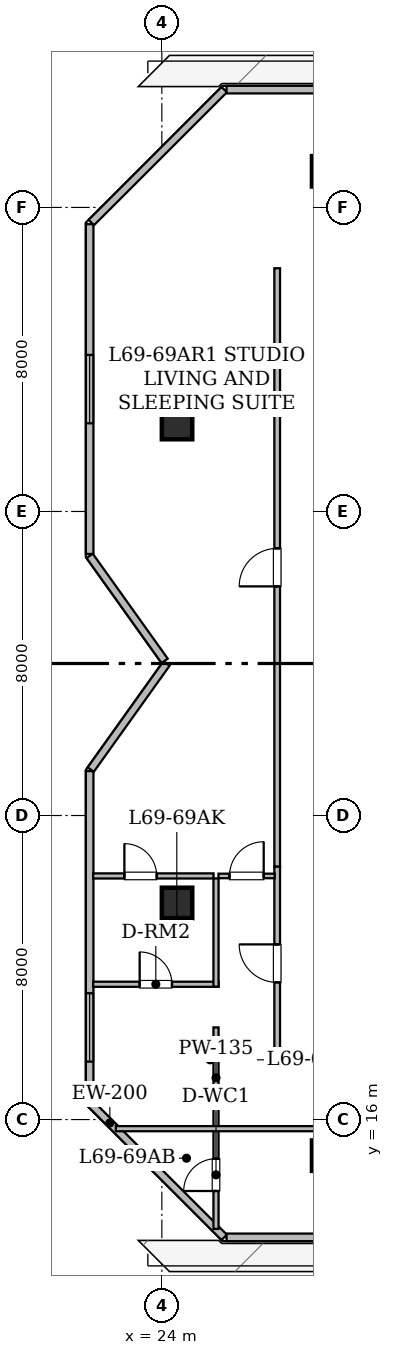
"""IFC4 building model, lengths in metres.
Left out: names, types, materials, properties, quantities, classifications, styles, units other than length and angle.
Written with IfcOpenShell. Run it as: python <this file> out.ifc"""

import sys

from ifc_helpers import new_model, si_unit, direction, frame, frame_2d, origin, origin_2d, place, context, subcontext, project, spatial, rectangle, hollow_rectangle, extrude, element, fill, save


model = new_model("IFC4")
c1 = context("Model", 3, precision=1e-05, world=origin(), true_north=direction((0.0, 1.0)))
c2 = subcontext(c1, "Body", "Model", "MODEL_VIEW")
j1 = project(units=[si_unit("LENGTHUNIT", "METRE"), si_unit("PLANEANGLEUNIT", "RADIAN")], contexts=[c1])
p1 = place(None, origin())
s1 = spatial("IfcSite", under=j1, at=p1, CompositionType="ELEMENT")
p2 = place(p1, origin())
s2 = spatial("IfcBuilding", under=s1, at=p2, CompositionType="ELEMENT")
p3 = place(p2, frame((0.0, 0.0, 269.45)))
s3 = spatial("IfcBuildingStorey", under=s2, at=p3, CompositionType="ELEMENT", Elevation=269.45)
for number, where, z_axis, x_axis in (
    (1, (28.35, 15.05, 0.025), (0.0, 0.0, 1.0), (1.0, 0.0, 0.0)),
    (2, (28.35, 40.95, 0.025), (0.0, 0.0, 1.0), (1.0, 0.0, 0.0)),
    (3, (24.4, 21.7, 0.025), (0.0, 0.0, 1.0), (1.0, 0.0, 0.0)),
    (4, (24.4, 34.3, 0.025), (0.0, 0.0, 1.0), (1.0, 0.0, 0.0)),
):
    element("IfcColumn", number, at=place(p3, frame(where, z_axis=z_axis, x_axis=x_axis)), inside=s3, PredefinedType="COLUMN", context=c2, shape_type="SweptSolid", body=[
        extrude(hollow_rectangle(XDim=0.8, YDim=0.8, WallThickness=0.04, at=origin_2d()), origin(), (0.0, 0.0, 1.0), 4.175),
    ])
p4 = place(p3, frame((25.641, 12.9, 0.0), z_axis=(0.0, 0.0, 1.0), x_axis=(-0.707106781187, 0.707106781187, 0.0)))
e5 = element("IfcWall", 5, at=p4, inside=s3, PredefinedType="STANDARD", context=c2, shape_type="SweptSolid", body=[
    extrude(rectangle(XDim=5.008, YDim=0.2, at=frame_2d((2.504, 0.0))), origin(), (0.0, 0.0, 1.0), 3.95),
])
p5 = place(p3, frame((22.1, 16.504, 0.0), z_axis=(0.0, 0.0, 1.0), x_axis=(0.0, 1.0, 0.0)))
e6 = element("IfcWall", 6, at=p5, inside=s3, PredefinedType="STANDARD", context=c2, shape_type="SweptSolid", body=[
    extrude(rectangle(XDim=8.664, YDim=0.2, at=frame_2d((4.332, 0.0))), origin(), (0.0, 0.0, 1.0), 3.95),
])
p6 = place(p5, frame((1.02, 0.0, 0.85)))
e7 = element("IfcOpeningElement", 7, at=p6, cuts=e6, PredefinedType="OPENING", context=c2, shape_type="SweptSolid", body=[
    extrude(rectangle(XDim=1.8, YDim=0.92, at=frame_2d((0.9, 0.46))), frame((0.0, 0.11, 0.0), z_axis=(0.0, -1.0, 0.0), x_axis=(1.0, 0.0, 0.0)), (0.0, 0.0, 1.0), 0.22),
])
p7 = place(p3, frame((22.128, 25.208, 0.0), z_axis=(0.0, 0.0, 1.0), x_axis=(0.581399701415, 0.813618084358, 0.0)))
e8 = element("IfcWall", 8, at=p7, inside=s3, PredefinedType="STANDARD", context=c2, shape_type="SweptSolid", body=[
    extrude(rectangle(XDim=3.432, YDim=0.2, at=frame_2d((1.716, 0.0))), origin(), (0.0, 0.0, 1.0), 3.95),
])
p8 = place(p3, frame((24.074, 28.069, 0.0), z_axis=(0.0, 0.0, 1.0), x_axis=(-0.581306204583, 0.813684887726, 0.0)))
e9 = element("IfcWall", 9, at=p8, inside=s3, PredefinedType="STANDARD", context=c2, shape_type="SweptSolid", body=[
    extrude(rectangle(XDim=3.396, YDim=0.2, at=frame_2d((1.698, 0.0))), origin(), (0.0, 0.0, 1.0), 3.95),
])
p9 = place(p3, frame((22.1, 30.882, 0.0), z_axis=(0.0, 0.0, 1.0), x_axis=(0.0, 1.0, 0.0)))
e10 = element("IfcWall", 10, at=p9, inside=s3, PredefinedType="STANDARD", context=c2, shape_type="SweptSolid", body=[
    extrude(rectangle(XDim=8.677, YDim=0.2, at=frame_2d((4.338, 0.0))), origin(), (0.0, 0.0, 1.0), 3.95),
])
p10 = place(p9, frame((3.438, 0.0, 0.85)))
e11 = element("IfcOpeningElement", 11, at=p10, cuts=e10, PredefinedType="OPENING", context=c2, shape_type="SweptSolid", body=[
    extrude(rectangle(XDim=1.8, YDim=0.92, at=frame_2d((0.9, 0.46))), frame((0.0, 0.11, 0.0), z_axis=(0.0, -1.0, 0.0), x_axis=(1.0, 0.0, 0.0)), (0.0, 0.0, 1.0), 0.22),
])
p11 = place(p3, frame((22.144, 39.603, 0.0), z_axis=(0.0, 0.0, 1.0), x_axis=(0.707106781187, 0.707106781187, 0.0)))
e12 = element("IfcWall", 12, at=p11, inside=s3, PredefinedType="STANDARD", context=c2, shape_type="SweptSolid", body=[
    extrude(rectangle(XDim=4.946, YDim=0.2, at=frame_2d((2.473, 0.0))), origin(), (0.0, 0.0, 1.0), 3.95),
])
p12 = place(p3, frame((25.702, 43.1, 0.0), z_axis=(0.0, 0.0, 1.0), x_axis=(1.0, 0.0, 0.0)))
e13 = element("IfcWall", 13, at=p12, inside=s3, PredefinedType="STANDARD", context=c2, shape_type="SweptSolid", body=[
    extrude(rectangle(XDim=38.657, YDim=0.2, at=frame_2d((19.329, 0.0))), origin(), (0.0, 0.0, 1.0), 3.95),
])
p13 = place(p12, frame((22.05, 0.0, 0.0)))
e14 = element("IfcOpeningElement", 14, at=p13, cuts=e13, PredefinedType="OPENING", context=c2, shape_type="SweptSolid", body=[
    extrude(rectangle(XDim=1.0, YDim=2.15, at=frame_2d((0.5, 1.075))), frame((0.0, 0.11, 0.0), z_axis=(0.0, -1.0, 0.0), x_axis=(1.0, 0.0, 0.0)), (0.0, 0.0, 1.0), 0.22),
])
p14 = place(p12, frame((18.633, 0.0, 0.78)))
e15 = element("IfcOpeningElement", 15, at=p14, cuts=e13, PredefinedType="OPENING", context=c2, shape_type="SweptSolid", body=[
    extrude(rectangle(XDim=1.2, YDim=1.5, at=frame_2d((0.6, 0.75))), frame((0.0, 0.11, 0.0), z_axis=(0.0, -1.0, 0.0), x_axis=(1.0, 0.0, 0.0)), (0.0, 0.0, 1.0), 0.22),
])
p15 = place(p12, frame((27.873, 0.0, 0.85)))
e16 = element("IfcOpeningElement", 16, at=p15, cuts=e13, PredefinedType="OPENING", context=c2, shape_type="SweptSolid", body=[
    extrude(rectangle(XDim=1.8, YDim=0.92, at=frame_2d((0.9, 0.46))), frame((0.0, 0.11, 0.0), z_axis=(0.0, -1.0, 0.0), x_axis=(1.0, 0.0, 0.0)), (0.0, 0.0, 1.0), 0.22),
])
p16 = place(p12, frame((35.193, 0.0, 0.85)))
e17 = element("IfcOpeningElement", 17, at=p16, cuts=e13, PredefinedType="OPENING", context=c2, shape_type="SweptSolid", body=[
    extrude(rectangle(XDim=1.8, YDim=0.92, at=frame_2d((0.9, 0.46))), frame((0.0, 0.11, 0.0), z_axis=(0.0, -1.0, 0.0), x_axis=(1.0, 0.0, 0.0)), (0.0, 0.0, 1.0), 0.22),
])
p17 = place(p3, frame((64.296, 12.9, 0.0), z_axis=(0.0, 0.0, 1.0), x_axis=(-1.0, 0.0, 0.0)))
e18 = element("IfcWall", 18, at=p17, inside=s3, PredefinedType="STANDARD", context=c2, shape_type="SweptSolid", body=[
    extrude(rectangle(XDim=38.593, YDim=0.2, at=frame_2d((19.296, 0.0))), origin(), (0.0, 0.0, 1.0), 3.95),
])
p18 = place(p17, frame((7.54, 0.0, 0.0)))
e19 = element("IfcOpeningElement", 19, at=p18, cuts=e18, PredefinedType="OPENING", context=c2, shape_type="SweptSolid", body=[
    extrude(rectangle(XDim=1.0, YDim=2.15, at=frame_2d((0.5, 1.075))), frame((0.0, 0.11, 0.0), z_axis=(0.0, -1.0, 0.0), x_axis=(1.0, 0.0, 0.0)), (0.0, 0.0, 1.0), 0.22),
])
p19 = place(p17, frame((18.396, 0.0, 0.78)))
e20 = element("IfcOpeningElement", 20, at=p19, cuts=e18, PredefinedType="OPENING", context=c2, shape_type="SweptSolid", body=[
    extrude(rectangle(XDim=1.2, YDim=1.5, at=frame_2d((0.6, 0.75))), frame((0.0, 0.11, 0.0), z_axis=(0.0, -1.0, 0.0), x_axis=(1.0, 0.0, 0.0)), (0.0, 0.0, 1.0), 0.22),
])
p20 = place(p17, frame((15.104, 0.0, 0.85)))
e21 = element("IfcOpeningElement", 21, at=p20, cuts=e18, PredefinedType="OPENING", context=c2, shape_type="SweptSolid", body=[
    extrude(rectangle(XDim=1.8, YDim=0.92, at=frame_2d((0.9, 0.46))), frame((0.0, 0.11, 0.0), z_axis=(0.0, -1.0, 0.0), x_axis=(1.0, 0.0, 0.0)), (0.0, 0.0, 1.0), 0.22),
])
p21 = place(p3, frame((27.035, 17.6, 0.0), z_axis=(0.0, 0.0, 1.0), x_axis=(0.0, 1.0, 0.0)))
e22 = element("IfcWall", 22, at=p21, inside=s3, PredefinedType="STANDARD", context=c2, shape_type="SweptSolid", body=[
    extrude(rectangle(XDim=5.059, YDim=0.15, at=frame_2d((2.529, 0.0))), origin(), (0.0, 0.0, 1.0), 3.237),
])
p22 = place(p21, frame((2.009, 0.0, 0.0)))
e23 = element("IfcOpeningElement", 23, at=p22, cuts=e22, PredefinedType="OPENING", context=c2, shape_type="SweptSolid", body=[
    extrude(rectangle(XDim=1.0, YDim=2.15, at=frame_2d((0.5, 1.075))), frame((0.0, 0.085, 0.0), z_axis=(0.0, -1.0, 0.0), x_axis=(1.0, 0.0, 0.0)), (0.0, 0.0, 1.0), 0.17),
])
p23 = place(p3, frame((27.035, 22.659, 0.0), z_axis=(0.0, 0.0, 1.0), x_axis=(0.0, 1.0, 0.0)))
e24 = element("IfcWall", 24, at=p23, inside=s3, PredefinedType="STANDARD", context=c2, shape_type="SweptSolid", body=[
    extrude(rectangle(XDim=15.741, YDim=0.15, at=frame_2d((7.871, 0.0))), origin(), (0.0, 0.0, 1.0), 3.237),
])
p24 = place(p23, frame((7.37, 0.0, 0.0)))
e25 = element("IfcOpeningElement", 25, at=p24, cuts=e24, PredefinedType="OPENING", context=c2, shape_type="SweptSolid", body=[
    extrude(rectangle(XDim=1.0, YDim=2.15, at=frame_2d((0.5, 1.075))), frame((0.0, 0.085, 0.0), z_axis=(0.0, -1.0, 0.0), x_axis=(1.0, 0.0, 0.0)), (0.0, 0.0, 1.0), 0.17),
])
p25 = place(p3, frame((25.425, 13.123, 0.0), z_axis=(0.0, 0.0, 1.0), x_axis=(0.0, 1.0, 0.0)))
e26 = element("IfcWall", 26, at=p25, inside=s3, PredefinedType="PARTITIONING", context=c2, shape_type="SweptSolid", body=[
    extrude(rectangle(XDim=5.302, YDim=0.135, at=frame_2d((2.651, 0.0))), origin(), (0.0, 0.0, 1.0), 3.95),
])
p26 = place(p25, frame((0.997, 0.0, 0.0)))
e27 = element("IfcOpeningElement", 27, at=p26, cuts=e26, PredefinedType="OPENING", context=c2, shape_type="SweptSolid", body=[
    extrude(rectangle(XDim=0.85, YDim=2.1, at=frame_2d((0.425, 1.05))), frame((0.0, 0.077, 0.0), z_axis=(0.0, -1.0, 0.0), x_axis=(1.0, 0.0, 0.0)), (0.0, 0.0, 1.0), 0.155),
])
p27 = place(p3, frame((28.09, 15.76, 0.0), z_axis=(0.0, 0.0, 1.0), x_axis=(-1.0, 0.0, 0.0)))
e28 = element("IfcWall", 28, at=p27, inside=s3, PredefinedType="PARTITIONING", context=c2, shape_type="SweptSolid", body=[
    extrude(rectangle(XDim=5.302, YDim=0.135, at=frame_2d((2.651, 0.0))), origin(), (0.0, 0.0, 1.0), 3.407),
])
p28 = place(p3, frame((22.192, 19.56, 0.0), z_axis=(0.0, 0.0, 1.0), x_axis=(1.0, 0.0, 0.0)))
e29 = element("IfcWall", 29, at=p28, inside=s3, PredefinedType="PARTITIONING", context=c2, shape_type="SweptSolid", body=[
    extrude(rectangle(XDim=3.298, YDim=0.135, at=frame_2d((1.649, 0.0))), origin(), (0.0, 0.0, 1.0), 3.95),
])
p29 = place(p28, frame((1.224, 0.0, 0.0)))
e30 = element("IfcOpeningElement", 30, at=p29, cuts=e29, PredefinedType="OPENING", context=c2, shape_type="SweptSolid", body=[
    extrude(rectangle(XDim=0.85, YDim=2.1, at=frame_2d((0.425, 1.05))), frame((0.0, 0.077, 0.0), z_axis=(0.0, -1.0, 0.0), x_axis=(1.0, 0.0, 0.0)), (0.0, 0.0, 1.0), 0.155),
])
p30 = place(p3, frame((25.425, 19.495, 0.0), z_axis=(0.0, 0.0, 1.0), x_axis=(0.0, 1.0, 0.0)))
e31 = element("IfcWall", 31, at=p30, inside=s3, PredefinedType="PARTITIONING", context=c2, shape_type="SweptSolid", body=[
    extrude(rectangle(XDim=2.85, YDim=0.135, at=frame_2d((1.425, 0.0))), origin(), (0.0, 0.0, 1.0), 3.237),
])
p31 = place(p3, frame((25.49, 22.41, 0.0), z_axis=(0.0, 0.0, 1.0), x_axis=(1.0, 0.0, 0.0)))
e32 = element("IfcWall", 32, at=p31, inside=s3, PredefinedType="PARTITIONING", context=c2, shape_type="SweptSolid", body=[
    extrude(rectangle(XDim=1.48, YDim=0.12, at=frame_2d((0.74, 0.0))), origin(), (0.0, 0.0, 1.0), 3.95),
])
p32 = place(p31, frame((0.29, 0.0, 0.0)))
e33 = element("IfcOpeningElement", 33, at=p32, cuts=e32, PredefinedType="OPENING", context=c2, shape_type="SweptSolid", body=[
    extrude(rectangle(XDim=0.9, YDim=2.1, at=frame_2d((0.45, 1.05))), frame((0.0, 0.07, 0.0), z_axis=(0.0, -1.0, 0.0), x_axis=(1.0, 0.0, 0.0)), (0.0, 0.0, 1.0), 0.14),
])
p33 = place(p3, frame((22.192, 22.41, 0.0), z_axis=(0.0, 0.0, 1.0), x_axis=(1.0, 0.0, 0.0)))
e34 = element("IfcWall", 34, at=p33, inside=s3, PredefinedType="PARTITIONING", context=c2, shape_type="SweptSolid", body=[
    extrude(rectangle(XDim=3.168, YDim=0.135, at=frame_2d((1.584, 0.0))), origin(), (0.0, 0.0, 1.0), 3.407),
])
p34 = place(p33, frame((0.822, 0.0, 0.0)))
e35 = element("IfcOpeningElement", 35, at=p34, cuts=e34, PredefinedType="OPENING", context=c2, shape_type="SweptSolid", body=[
    extrude(rectangle(XDim=0.85, YDim=2.1, at=frame_2d((0.425, 1.05))), frame((0.0, 0.077, 0.0), z_axis=(0.0, -1.0, 0.0), x_axis=(1.0, 0.0, 0.0)), (0.0, 0.0, 1.0), 0.155),
])
p35 = place(p6, origin())
e36 = element("IfcWindow", 36, at=p35, inside=s3, PartitioningType="SINGLE_PANEL", PredefinedType="WINDOW", context=c2, shape_type="SweptSolid", body=[
    extrude(rectangle(XDim=1.8, YDim=0.92, at=frame_2d((0.9, 0.46))), frame((0.0, 0.03, 0.0), z_axis=(0.0, -1.0, 0.0), x_axis=(1.0, 0.0, 0.0)), (0.0, 0.0, 1.0), 0.06),
])
fill(e7, e36)
p36 = place(p10, origin())
e37 = element("IfcWindow", 37, at=p36, inside=s3, PartitioningType="SINGLE_PANEL", PredefinedType="WINDOW", context=c2, shape_type="SweptSolid", body=[
    extrude(rectangle(XDim=1.8, YDim=0.92, at=frame_2d((0.9, 0.46))), frame((0.0, 0.03, 0.0), z_axis=(0.0, -1.0, 0.0), x_axis=(1.0, 0.0, 0.0)), (0.0, 0.0, 1.0), 0.06),
])
fill(e11, e37)
p37 = place(p22, origin())
e38 = element("IfcDoor", 38, at=p37, inside=s3, OperationType="SINGLE_SWING_RIGHT", PredefinedType="DOOR", context=c2, shape_type="SweptSolid", body=[
    extrude(rectangle(XDim=1.0, YDim=2.15, at=frame_2d((0.5, 1.075))), frame((0.0, 0.025, 0.0), z_axis=(0.0, -1.0, 0.0), x_axis=(1.0, 0.0, 0.0)), (0.0, 0.0, 1.0), 0.05),
])
fill(e23, e38)
p38 = place(p24, origin())
e39 = element("IfcDoor", 39, at=p38, inside=s3, OperationType="SINGLE_SWING_LEFT", PredefinedType="DOOR", context=c2, shape_type="SweptSolid", body=[
    extrude(rectangle(XDim=1.0, YDim=2.15, at=frame_2d((0.5, 1.075))), frame((0.0, 0.025, 0.0), z_axis=(0.0, -1.0, 0.0), x_axis=(1.0, 0.0, 0.0)), (0.0, 0.0, 1.0), 0.05),
])
fill(e25, e39)
p39 = place(p26, origin())
e40 = element("IfcDoor", 40, at=p39, inside=s3, OperationType="SINGLE_SWING_LEFT", PredefinedType="DOOR", context=c2, shape_type="SweptSolid", body=[
    extrude(rectangle(XDim=0.85, YDim=2.1, at=frame_2d((0.425, 1.05))), frame((0.0, 0.025, 0.0), z_axis=(0.0, -1.0, 0.0), x_axis=(1.0, 0.0, 0.0)), (0.0, 0.0, 1.0), 0.05),
])
fill(e27, e40)
p40 = place(p29, origin())
e41 = element("IfcDoor", 41, at=p40, inside=s3, OperationType="SINGLE_SWING_LEFT", PredefinedType="DOOR", context=c2, shape_type="SweptSolid", body=[
    extrude(rectangle(XDim=0.85, YDim=2.1, at=frame_2d((0.425, 1.05))), frame((0.0, 0.025, 0.0), z_axis=(0.0, -1.0, 0.0), x_axis=(1.0, 0.0, 0.0)), (0.0, 0.0, 1.0), 0.05),
])
fill(e30, e41)
p41 = place(p32, origin())
e42 = element("IfcDoor", 42, at=p41, inside=s3, OperationType="SINGLE_SWING_RIGHT", PredefinedType="DOOR", context=c2, shape_type="SweptSolid", body=[
    extrude(rectangle(XDim=0.9, YDim=2.1, at=frame_2d((0.45, 1.05))), frame((0.0, 0.025, 0.0), z_axis=(0.0, -1.0, 0.0), x_axis=(1.0, 0.0, 0.0)), (0.0, 0.0, 1.0), 0.05),
])
fill(e33, e42)
p42 = place(p34, origin())
e43 = element("IfcDoor", 43, at=p42, inside=s3, OperationType="SINGLE_SWING_LEFT", PredefinedType="DOOR", context=c2, shape_type="SweptSolid", body=[
    extrude(rectangle(XDim=0.85, YDim=2.1, at=frame_2d((0.425, 1.05))), frame((0.0, 0.025, 0.0), z_axis=(0.0, -1.0, 0.0), x_axis=(1.0, 0.0, 0.0)), (0.0, 0.0, 1.0), 0.05),
])
fill(e35, e43)
save(model, sys.argv[1])
